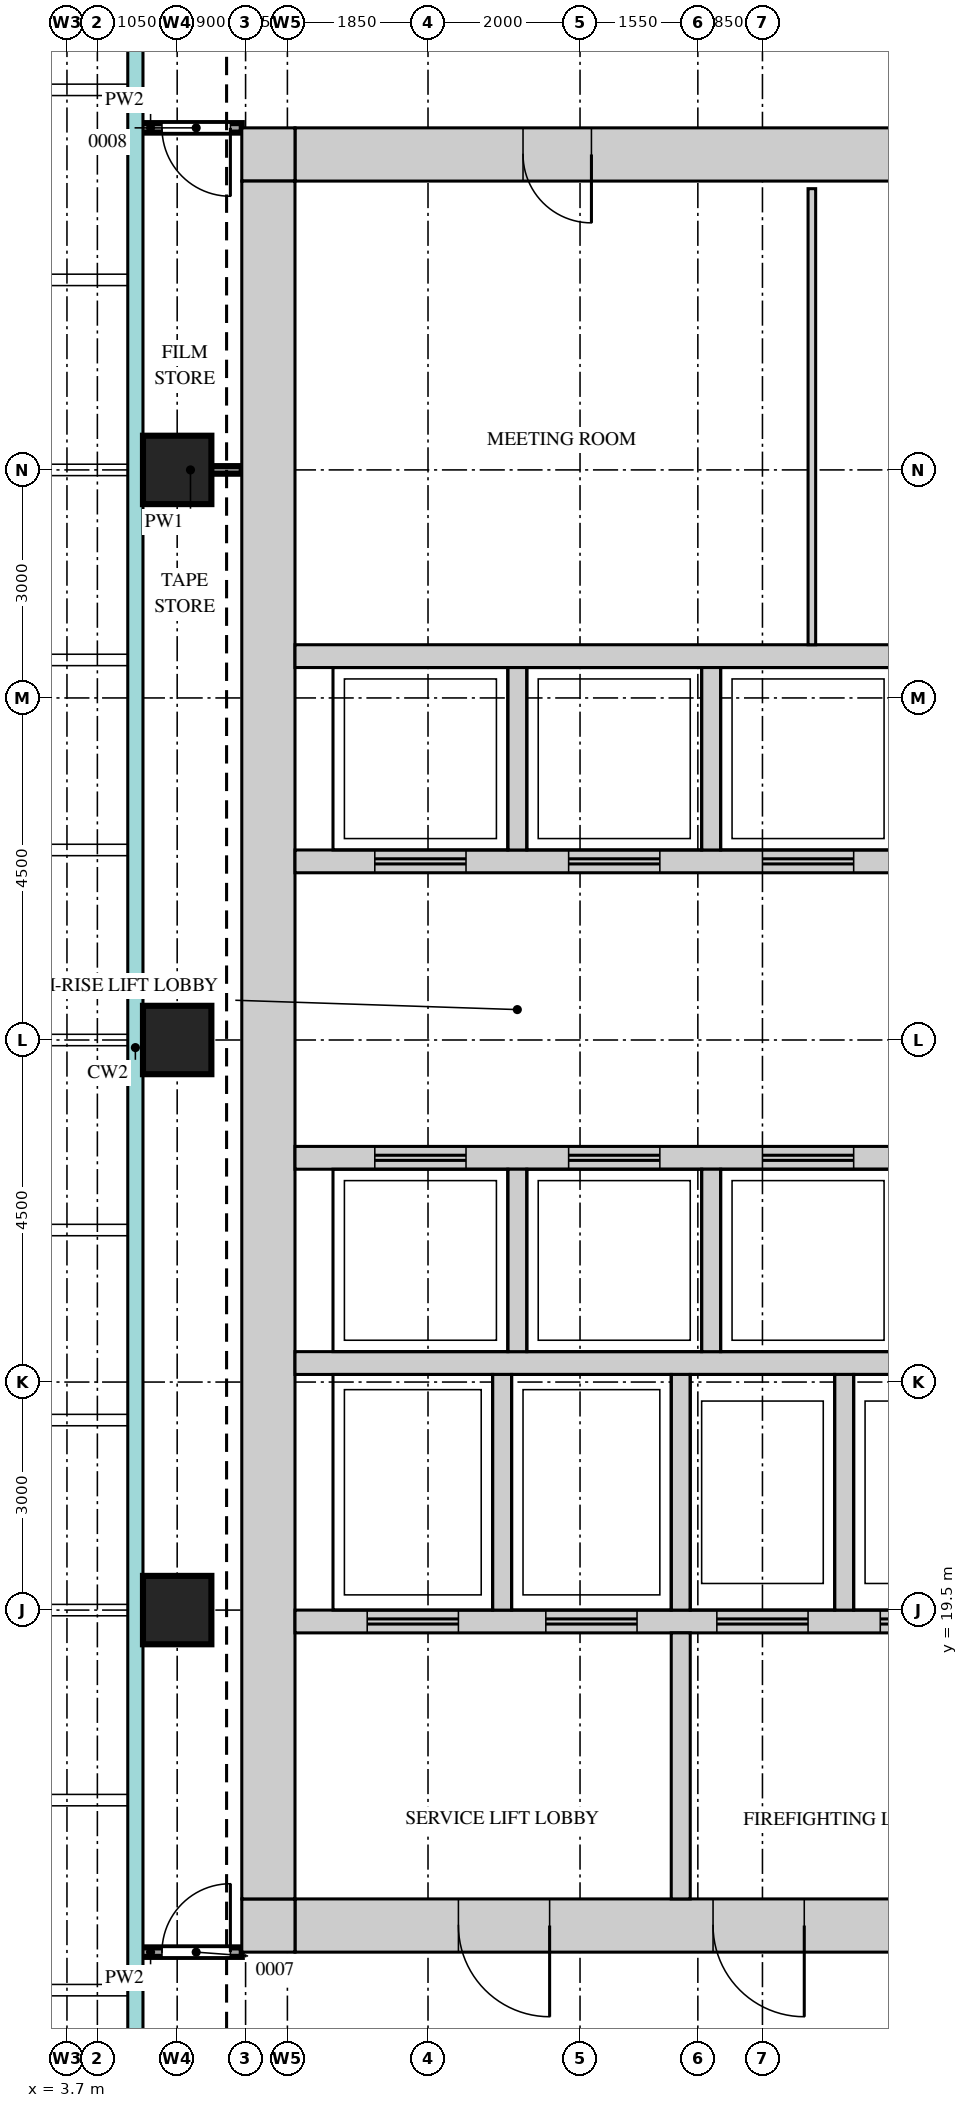
"""IFC4 building model, lengths in metres.
Left out: names, types, materials, properties, quantities, classifications, styles, units other than length and angle.
Written with IfcOpenShell. Run it as: python <this file> out.ifc"""

import sys

from ifc_helpers import new_model, si_unit, direction, frame, frame_2d, origin, origin_2d, place, context, subcontext, project, spatial, rectangle, extrude, source, transform, mapped, element, fill, save


model = new_model("IFC4")
c1 = context("Model", 3, precision=1e-05, world=origin(), true_north=direction((0.0, 1.0)))
c2 = subcontext(c1, "Body", "Model", "MODEL_VIEW")
j1 = project(units=[si_unit("LENGTHUNIT", "METRE"), si_unit("PLANEANGLEUNIT", "RADIAN")], contexts=[c1])
p1 = place(None, origin())
s1 = spatial("IfcSite", under=j1, at=p1, CompositionType="ELEMENT")
p2 = place(p1, origin())
s2 = spatial("IfcBuilding", under=s1, at=p2, CompositionType="ELEMENT")
p3 = place(p2, frame((0.0, 0.0, 246.2)))
s3 = spatial("IfcBuildingStorey", under=s2, at=p3, CompositionType="ELEMENT", Elevation=246.2)
m1 = source(origin(), c2, "Body", "SweptSolid", [
    extrude(rectangle(XDim=13.6, YDim=0.7, at=frame_2d((6.8, 0.0))), origin(), (0.0, 0.0, 1.0), 3.75),
])
p4 = place(p3, frame((6.7, 38.65, 0.0), z_axis=(0.0, 0.0, 1.0), x_axis=(1.0, 0.0, 0.0)))
e1 = element("IfcWall", 1, at=p4, inside=s3, PredefinedType="SHEAR", context=c2, shape_type="MappedRepresentation", body=[
    mapped(m1, transform((0.0, 0.0, 0.0))),
])
m2 = source(origin(), c2, "Body", "SweptSolid", [
    extrude(rectangle(XDim=0.9, YDim=2.1, at=frame_2d((0.45, 1.05))), frame((0.0, 0.36, 0.0), z_axis=(0.0, -1.0, 0.0), x_axis=(1.0, 0.0, 0.0)), (0.0, 0.0, 1.0), 0.72),
])
p5 = place(p4, frame((3.0, 0.0, 0.0)))
e2 = element("IfcOpeningElement", 2, at=p5, cuts=e1, PredefinedType="OPENING", context=c2, shape_type="MappedRepresentation", body=[
    mapped(m2, transform((0.0, 0.0, 0.0))),
])
p6 = place(p4, frame((9.7, 0.0, 0.0)))
e3 = element("IfcOpeningElement", 3, at=p6, cuts=e1, PredefinedType="OPENING", context=c2, shape_type="MappedRepresentation", body=[
    mapped(m2, transform((0.0, 0.0, 0.0))),
])
m3 = source(origin(), c2, "Body", "SweptSolid", [
    extrude(rectangle(XDim=0.7, YDim=0.7, at=frame_2d((0.35, 0.0))), origin(), (0.0, 0.0, 1.0), 3.75),
])
p7 = place(p3, frame((6.0, 38.65, 0.0), z_axis=(0.0, 0.0, 1.0), x_axis=(1.0, 0.0, 0.0)))
e4 = element("IfcWall", 4, at=p7, inside=s3, PredefinedType="SHEAR", context=c2, shape_type="MappedRepresentation", body=[
    mapped(m3, transform((0.0, 0.0, 0.0))),
])
p8 = place(p3, frame((6.7, 15.35, 0.0), z_axis=(0.0, 0.0, 1.0), x_axis=(1.0, 0.0, 0.0)))
e5 = element("IfcWall", 5, at=p8, inside=s3, PredefinedType="SHEAR", context=c2, shape_type="MappedRepresentation", body=[
    mapped(m1, transform((0.0, 0.0, 0.0))),
])
m4 = source(origin(), c2, "Body", "SweptSolid", [
    extrude(rectangle(XDim=1.2, YDim=2.1, at=frame_2d((0.6, 1.05))), frame((0.0, 0.36, 0.0), z_axis=(0.0, -1.0, 0.0), x_axis=(1.0, 0.0, 0.0)), (0.0, 0.0, 1.0), 0.72),
])
p9 = place(p8, frame((5.5, 0.0, 0.0)))
e6 = element("IfcOpeningElement", 6, at=p9, cuts=e5, PredefinedType="OPENING", context=c2, shape_type="MappedRepresentation", body=[
    mapped(m4, transform((0.0, 0.0, 0.0))),
])
p10 = place(p8, frame((2.15, 0.0, 0.0)))
e7 = element("IfcOpeningElement", 7, at=p10, cuts=e5, PredefinedType="OPENING", context=c2, shape_type="MappedRepresentation", body=[
    mapped(m4, transform((0.0, 0.0, 0.0))),
])
m5 = source(origin(), c2, "Body", "SweptSolid", [
    extrude(rectangle(XDim=1.0, YDim=2.1, at=frame_2d((0.5, 1.05))), frame((0.0, 0.36, 0.0), z_axis=(0.0, -1.0, 0.0), x_axis=(1.0, 0.0, 0.0)), (0.0, 0.0, 1.0), 0.72),
])
p11 = place(p8, frame((8.0, 0.0, 0.0)))
e8 = element("IfcOpeningElement", 8, at=p11, cuts=e5, PredefinedType="OPENING", context=c2, shape_type="MappedRepresentation", body=[
    mapped(m5, transform((0.0, 0.0, 0.0))),
])
p12 = place(p3, frame((6.0, 15.35, 0.0), z_axis=(0.0, 0.0, 1.0), x_axis=(1.0, 0.0, 0.0)))
e9 = element("IfcWall", 9, at=p12, inside=s3, PredefinedType="SHEAR", context=c2, shape_type="MappedRepresentation", body=[
    mapped(m3, transform((0.0, 0.0, 0.0))),
])
m6 = source(origin(), c2, "Body", "SweptSolid", [
    extrude(rectangle(XDim=22.6, YDim=0.7, at=frame_2d((11.3, 0.0))), origin(), (0.0, 0.0, 1.0), 3.75),
])
p13 = place(p3, frame((6.35, 15.7, 0.0), z_axis=(0.0, 0.0, 1.0), x_axis=(0.0, 1.0, 0.0)))
e10 = element("IfcWall", 10, at=p13, inside=s3, PredefinedType="SHEAR", context=c2, shape_type="MappedRepresentation", body=[
    mapped(m6, transform((0.0, 0.0, 0.0))),
])
m7 = source(origin(), c2, "Body", "SweptSolid", [
    extrude(rectangle(XDim=13.6, YDim=0.3, at=frame_2d((6.8, 0.0))), origin(), (0.0, 0.0, 1.0), 3.75),
])
p14 = place(p3, frame((6.7, 22.75, 0.0), z_axis=(0.0, 0.0, 1.0), x_axis=(1.0, 0.0, 0.0)))
e11 = element("IfcWall", 11, at=p14, inside=s3, PredefinedType="STANDARD", context=c2, shape_type="MappedRepresentation", body=[
    mapped(m7, transform((0.0, 0.0, 0.0))),
])
m8 = source(origin(), c2, "Body", "SweptSolid", [
    extrude(rectangle(XDim=9.375, YDim=0.3, at=frame_2d((4.688, 0.0))), origin(), (0.0, 0.0, 1.0), 3.75),
])
p15 = place(p3, frame((6.7, 19.35, 0.0), z_axis=(0.0, 0.0, 1.0), x_axis=(1.0, 0.0, 0.0)))
e12 = element("IfcWall", 12, at=p15, inside=s3, PredefinedType="STANDARD", context=c2, shape_type="MappedRepresentation", body=[
    mapped(m8, transform((0.0, 0.0, 0.0))),
])
m9 = source(origin(), c2, "Body", "SweptSolid", [
    extrude(rectangle(XDim=1.2, YDim=2.1, at=frame_2d((0.6, 1.05))), frame((0.0, 0.16, 0.0), z_axis=(0.0, -1.0, 0.0), x_axis=(1.0, 0.0, 0.0)), (0.0, 0.0, 1.0), 0.32),
])
p16 = place(p15, frame((0.95, 0.0, 0.0)))
e13 = element("IfcOpeningElement", 13, at=p16, cuts=e12, PredefinedType="OPENING", context=c2, shape_type="MappedRepresentation", body=[
    mapped(m9, transform((0.0, 0.0, 0.0))),
])
p17 = place(p15, frame((3.3, 0.0, 0.0)))
e14 = element("IfcOpeningElement", 14, at=p17, cuts=e12, PredefinedType="OPENING", context=c2, shape_type="MappedRepresentation", body=[
    mapped(m9, transform((0.0, 0.0, 0.0))),
])
p18 = place(p15, frame((5.55, 0.0, 0.0)))
e15 = element("IfcOpeningElement", 15, at=p18, cuts=e12, PredefinedType="OPENING", context=c2, shape_type="MappedRepresentation", body=[
    mapped(m9, transform((0.0, 0.0, 0.0))),
])
p19 = place(p15, frame((7.7, 0.0, 0.0)))
e16 = element("IfcOpeningElement", 16, at=p19, cuts=e12, PredefinedType="OPENING", context=c2, shape_type="MappedRepresentation", body=[
    mapped(m9, transform((0.0, 0.0, 0.0))),
])
p20 = place(p3, frame((6.7, 32.05, 0.0), z_axis=(0.0, 0.0, 1.0), x_axis=(1.0, 0.0, 0.0)))
e17 = element("IfcWall", 17, at=p20, inside=s3, PredefinedType="STANDARD", context=c2, shape_type="MappedRepresentation", body=[
    mapped(m7, transform((0.0, 0.0, 0.0))),
])
p21 = place(p3, frame((6.7, 29.35, 0.0), z_axis=(0.0, 0.0, 1.0), x_axis=(1.0, 0.0, 0.0)))
e18 = element("IfcWall", 18, at=p21, inside=s3, PredefinedType="STANDARD", context=c2, shape_type="MappedRepresentation", body=[
    mapped(m7, transform((0.0, 0.0, 0.0))),
])
p22 = place(p21, frame((1.05, 0.0, 0.0)))
e19 = element("IfcOpeningElement", 19, at=p22, cuts=e18, PredefinedType="OPENING", context=c2, shape_type="MappedRepresentation", body=[
    mapped(m9, transform((0.0, 0.0, 0.0))),
])
p23 = place(p21, frame((3.6, 0.0, 0.0)))
e20 = element("IfcOpeningElement", 20, at=p23, cuts=e18, PredefinedType="OPENING", context=c2, shape_type="MappedRepresentation", body=[
    mapped(m9, transform((0.0, 0.0, 0.0))),
])
p24 = place(p21, frame((6.15, 0.0, 0.0)))
e21 = element("IfcOpeningElement", 21, at=p24, cuts=e18, PredefinedType="OPENING", context=c2, shape_type="MappedRepresentation", body=[
    mapped(m9, transform((0.0, 0.0, 0.0))),
])
p25 = place(p21, frame((8.7, 0.0, 0.0)))
e22 = element("IfcOpeningElement", 22, at=p25, cuts=e18, PredefinedType="OPENING", context=c2, shape_type="MappedRepresentation", body=[
    mapped(m9, transform((0.0, 0.0, 0.0))),
])
p26 = place(p21, frame((11.25, 0.0, 0.0)))
e23 = element("IfcOpeningElement", 23, at=p26, cuts=e18, PredefinedType="OPENING", context=c2, shape_type="MappedRepresentation", body=[
    mapped(m9, transform((0.0, 0.0, 0.0))),
])
p27 = place(p3, frame((6.7, 25.45, 0.0), z_axis=(0.0, 0.0, 1.0), x_axis=(1.0, 0.0, 0.0)))
e24 = element("IfcWall", 24, at=p27, inside=s3, PredefinedType="STANDARD", context=c2, shape_type="MappedRepresentation", body=[
    mapped(m7, transform((0.0, 0.0, 0.0))),
])
p28 = place(p27, frame((1.05, 0.0, 0.0)))
e25 = element("IfcOpeningElement", 25, at=p28, cuts=e24, PredefinedType="OPENING", context=c2, shape_type="MappedRepresentation", body=[
    mapped(m9, transform((0.0, 0.0, 0.0))),
])
p29 = place(p27, frame((3.6, 0.0, 0.0)))
e26 = element("IfcOpeningElement", 26, at=p29, cuts=e24, PredefinedType="OPENING", context=c2, shape_type="MappedRepresentation", body=[
    mapped(m9, transform((0.0, 0.0, 0.0))),
])
p30 = place(p27, frame((6.15, 0.0, 0.0)))
e27 = element("IfcOpeningElement", 27, at=p30, cuts=e24, PredefinedType="OPENING", context=c2, shape_type="MappedRepresentation", body=[
    mapped(m9, transform((0.0, 0.0, 0.0))),
])
p31 = place(p27, frame((8.7, 0.0, 0.0)))
e28 = element("IfcOpeningElement", 28, at=p31, cuts=e24, PredefinedType="OPENING", context=c2, shape_type="MappedRepresentation", body=[
    mapped(m9, transform((0.0, 0.0, 0.0))),
])
p32 = place(p27, frame((11.25, 0.0, 0.0)))
e29 = element("IfcOpeningElement", 29, at=p32, cuts=e24, PredefinedType="OPENING", context=c2, shape_type="MappedRepresentation", body=[
    mapped(m9, transform((0.0, 0.0, 0.0))),
])
m10 = source(origin(), c2, "Body", "SweptSolid", [
    extrude(rectangle(XDim=3.1, YDim=0.25, at=frame_2d((1.55, 0.0))), origin(), (0.0, 0.0, 1.0), 3.75),
])
for number, where, z_axis, x_axis in (
    (30, (9.425, 19.5, 0.0), (0.0, 0.0, 1.0), (0.0, 1.0, 0.0)),
    (31, (11.775, 19.5, 0.0), (0.0, 0.0, 1.0), (0.0, 1.0, 0.0)),
    (32, (13.925, 19.5, 0.0), (0.0, 0.0, 1.0), (0.0, 1.0, 0.0)),
):
    element("IfcWall", number, at=place(p3, frame(where, z_axis=z_axis, x_axis=x_axis)), inside=s3, PredefinedType="STANDARD", context=c2, shape_type="MappedRepresentation", body=[
        mapped(m10, transform((0.0, 0.0, 0.0))),
    ])
m11 = source(origin(), c2, "Body", "SweptSolid", [
    extrude(rectangle(XDim=2.4, YDim=0.25, at=frame_2d((1.2, 0.0))), origin(), (0.0, 0.0, 1.0), 3.75),
])
for number, where, z_axis, x_axis in (
    (33, (9.625, 29.5, 0.0), (0.0, 0.0, 1.0), (0.0, 1.0, 0.0)),
    (34, (12.175, 29.5, 0.0), (0.0, 0.0, 1.0), (0.0, 1.0, 0.0)),
):
    element("IfcWall", number, at=place(p3, frame(where, z_axis=z_axis, x_axis=x_axis)), inside=s3, PredefinedType="STANDARD", context=c2, shape_type="MappedRepresentation", body=[
        mapped(m11, transform((0.0, 0.0, 0.0))),
    ])
m12 = source(origin(), c2, "Body", "SweptSolid", [
    extrude(rectangle(XDim=2.4, YDim=0.25, at=frame_2d((1.2, 0.0))), origin(), (0.0, 0.0, 1.0), 3.75),
])
for number, where, z_axis, x_axis in (
    (35, (9.625, 22.9, 0.0), (0.0, 0.0, 1.0), (0.0, 1.0, 0.0)),
    (36, (12.175, 22.9, 0.0), (0.0, 0.0, 1.0), (0.0, 1.0, 0.0)),
):
    element("IfcWall", number, at=place(p3, frame(where, z_axis=z_axis, x_axis=x_axis)), inside=s3, PredefinedType="STANDARD", context=c2, shape_type="MappedRepresentation", body=[
        mapped(m12, transform((0.0, 0.0, 0.0))),
    ])
m13 = source(origin(), c2, "Body", "SweptSolid", [
    extrude(rectangle(XDim=3.5, YDim=0.25, at=frame_2d((1.75, 0.0))), origin(), (0.0, 0.0, 1.0), 3.75),
])
p33 = place(p3, frame((11.775, 15.7, 0.0), z_axis=(0.0, 0.0, 1.0), x_axis=(0.0, 1.0, 0.0)))
e37 = element("IfcWall", 37, at=p33, inside=s3, PredefinedType="STANDARD", context=c2, shape_type="MappedRepresentation", body=[
    mapped(m13, transform((0.0, 0.0, 0.0))),
])
m14 = source(origin(), c2, "Body", "SweptSolid", [
    extrude(rectangle(XDim=0.9, YDim=0.9, at=origin_2d()), origin(), (0.0, 0.0, 1.0), 3.75),
])
for number, where, z_axis, x_axis in (
    (38, (5.15, 19.5, 0.0), (0.0, 0.0, 1.0), (1.0, 0.0, 0.0)),
    (39, (5.15, 27.0, 0.0), (0.0, 0.0, 1.0), (1.0, 0.0, 0.0)),
    (40, (5.15, 34.5, 0.0), (0.0, 0.0, 1.0), (1.0, 0.0, 0.0)),
):
    element("IfcColumn", number, at=place(p3, frame(where, z_axis=z_axis, x_axis=x_axis)), inside=s3, PredefinedType="COLUMN", context=c2, shape_type="MappedRepresentation", body=[
        mapped(m14, transform((0.0, 0.0, 0.0))),
    ])
m15 = source(origin(), c2, "Body", "SweptSolid", [
    extrude(rectangle(XDim=1.35, YDim=0.125, at=frame_2d((0.675, 0.0))), origin(), (0.0, 0.0, 1.0), 3.8),
])
p34 = place(p3, frame((4.65, 15.0, 0.0), z_axis=(0.0, 0.0, 1.0), x_axis=(1.0, 0.0, 0.0)))
e41 = element("IfcWall", 41, at=p34, inside=s3, PredefinedType="PARTITIONING", context=c2, shape_type="MappedRepresentation", body=[
    mapped(m15, transform((0.0, 0.0, 0.0))),
])
m16 = source(origin(), c2, "Body", "SweptSolid", [
    extrude(rectangle(XDim=0.9, YDim=2.1, at=frame_2d((0.45, 1.05))), frame((0.0, 0.073, 0.0), z_axis=(0.0, -1.0, 0.0), x_axis=(1.0, 0.0, 0.0)), (0.0, 0.0, 1.0), 0.145),
])
p35 = place(p34, frame((0.3, 0.0, 0.0)))
e42 = element("IfcOpeningElement", 42, at=p35, cuts=e41, PredefinedType="OPENING", context=c2, shape_type="MappedRepresentation", body=[
    mapped(m16, transform((0.0, 0.0, 0.0))),
])
m17 = source(origin(), c2, "Body", "SweptSolid", [
    extrude(rectangle(XDim=6.0, YDim=0.1, at=frame_2d((3.0, 0.0))), origin(), (0.0, 0.0, 1.0), 3.8),
])
p36 = place(p3, frame((13.5, 32.2, 0.0), z_axis=(0.0, 0.0, 1.0), x_axis=(0.0, 1.0, 0.0)))
e43 = element("IfcWall", 43, at=p36, inside=s3, PredefinedType="PARTITIONING", context=c2, shape_type="MappedRepresentation", body=[
    mapped(m17, transform((0.0, 0.0, 0.0))),
])
m18 = source(origin(), c2, "Body", "SweptSolid", [
    extrude(rectangle(XDim=1.35, YDim=0.1, at=frame_2d((0.675, 0.0))), origin(), (0.0, 0.0, 1.0), 3.8),
])
p37 = place(p3, frame((4.65, 34.5, 0.0), z_axis=(0.0, 0.0, 1.0), x_axis=(1.0, 0.0, 0.0)))
e44 = element("IfcWall", 44, at=p37, inside=s3, PredefinedType="PARTITIONING", context=c2, shape_type="MappedRepresentation", body=[
    mapped(m18, transform((0.0, 0.0, 0.0))),
])
p38 = place(p3, frame((4.65, 39.0, 0.0), z_axis=(0.0, 0.0, 1.0), x_axis=(1.0, 0.0, 0.0)))
e45 = element("IfcWall", 45, at=p38, inside=s3, PredefinedType="PARTITIONING", context=c2, shape_type="MappedRepresentation", body=[
    mapped(m15, transform((0.0, 0.0, 0.0))),
])
p39 = place(p38, frame((0.3, 0.0, 0.0)))
e46 = element("IfcOpeningElement", 46, at=p39, cuts=e45, PredefinedType="OPENING", context=c2, shape_type="MappedRepresentation", body=[
    mapped(m16, transform((0.0, 0.0, 0.0))),
])
m19 = source(origin(), c2, "Body", "SweptSolid", [
    extrude(rectangle(XDim=0.9, YDim=2.1, at=frame_2d((0.45, 1.05))), frame((0.0, 0.3, 0.0), z_axis=(0.0, -1.0, 0.0), x_axis=(1.0, 0.0, 0.0)), (0.0, 0.0, 1.0), 0.6),
])
p40 = place(p5, origin())
e47 = element("IfcDoor", 47, at=p40, inside=s3, OperationType="SINGLE_SWING_RIGHT", PredefinedType="DOOR", context=c2, shape_type="MappedRepresentation", body=[
    mapped(m19, transform((0.0, 0.0, 0.0))),
])
fill(e2, e47)
m20 = source(origin(), c2, "Body", "SweptSolid", [
    extrude(rectangle(XDim=1.2, YDim=2.1, at=frame_2d((0.6, 1.05))), frame((0.0, 0.3, 0.0), z_axis=(0.0, -1.0, 0.0), x_axis=(1.0, 0.0, 0.0)), (0.0, 0.0, 1.0), 0.6),
])
p41 = place(p9, origin())
e48 = element("IfcDoor", 48, at=p41, inside=s3, OperationType="SINGLE_SWING_RIGHT", PredefinedType="DOOR", context=c2, shape_type="MappedRepresentation", body=[
    mapped(m20, transform((0.0, 0.0, 0.0))),
])
fill(e6, e48)
p42 = place(p10, origin())
e49 = element("IfcDoor", 49, at=p42, inside=s3, OperationType="SINGLE_SWING_RIGHT", PredefinedType="DOOR", context=c2, shape_type="MappedRepresentation", body=[
    mapped(m20, transform((0.0, 0.0, 0.0))),
])
fill(e7, e49)
m21 = source(origin(), c2, "Body", "SweptSolid", [
    extrude(rectangle(XDim=0.9, YDim=2.1, at=frame_2d((0.45, 1.05))), frame((0.0, 0.025, 0.0), z_axis=(0.0, -1.0, 0.0), x_axis=(1.0, 0.0, 0.0)), (0.0, 0.0, 1.0), 0.05),
])
p43 = place(p35, origin())
e50 = element("IfcDoor", 50, at=p43, inside=s3, OperationType="SINGLE_SWING_LEFT", PredefinedType="DOOR", context=c2, shape_type="MappedRepresentation", body=[
    mapped(m21, transform((0.0, 0.0, 0.0))),
])
fill(e42, e50)
p44 = place(p39, origin())
e51 = element("IfcDoor", 51, at=p44, inside=s3, OperationType="SINGLE_SWING_RIGHT", PredefinedType="DOOR", context=c2, shape_type="MappedRepresentation", body=[
    mapped(m21, transform((0.0, 0.0, 0.0))),
])
fill(e46, e51)
m22 = source(origin(), c2, "Body", "SweptSolid", [
    extrude(rectangle(XDim=1.2, YDim=2.1, at=frame_2d((0.6, 1.05))), frame((0.0, 0.025, 0.0), z_axis=(0.0, -1.0, 0.0), x_axis=(1.0, 0.0, 0.0)), (0.0, 0.0, 1.0), 0.05),
])
p45 = place(p28, origin())
e52 = element("IfcDoor", 52, at=p45, inside=s3, OperationType="DOUBLE_DOOR_SLIDING", PredefinedType="DOOR", context=c2, shape_type="MappedRepresentation", body=[
    mapped(m22, transform((0.0, 0.0, 0.0))),
])
fill(e25, e52)
p46 = place(p29, origin())
e53 = element("IfcDoor", 53, at=p46, inside=s3, OperationType="DOUBLE_DOOR_SLIDING", PredefinedType="DOOR", context=c2, shape_type="MappedRepresentation", body=[
    mapped(m22, transform((0.0, 0.0, 0.0))),
])
fill(e26, e53)
p47 = place(p30, origin())
e54 = element("IfcDoor", 54, at=p47, inside=s3, OperationType="DOUBLE_DOOR_SLIDING", PredefinedType="DOOR", context=c2, shape_type="MappedRepresentation", body=[
    mapped(m22, transform((0.0, 0.0, 0.0))),
])
fill(e27, e54)
p48 = place(p22, origin())
e55 = element("IfcDoor", 55, at=p48, inside=s3, OperationType="DOUBLE_DOOR_SLIDING", PredefinedType="DOOR", context=c2, shape_type="MappedRepresentation", body=[
    mapped(m22, transform((0.0, 0.0, 0.0))),
])
fill(e19, e55)
p49 = place(p23, origin())
e56 = element("IfcDoor", 56, at=p49, inside=s3, OperationType="DOUBLE_DOOR_SLIDING", PredefinedType="DOOR", context=c2, shape_type="MappedRepresentation", body=[
    mapped(m22, transform((0.0, 0.0, 0.0))),
])
fill(e20, e56)
p50 = place(p24, origin())
e57 = element("IfcDoor", 57, at=p50, inside=s3, OperationType="DOUBLE_DOOR_SLIDING", PredefinedType="DOOR", context=c2, shape_type="MappedRepresentation", body=[
    mapped(m22, transform((0.0, 0.0, 0.0))),
])
fill(e21, e57)
p51 = place(p16, origin())
e58 = element("IfcDoor", 58, at=p51, inside=s3, OperationType="DOUBLE_DOOR_SLIDING", PredefinedType="DOOR", context=c2, shape_type="MappedRepresentation", body=[
    mapped(m22, transform((0.0, 0.0, 0.0))),
])
fill(e13, e58)
p52 = place(p17, origin())
e59 = element("IfcDoor", 59, at=p52, inside=s3, OperationType="DOUBLE_DOOR_SLIDING", PredefinedType="DOOR", context=c2, shape_type="MappedRepresentation", body=[
    mapped(m22, transform((0.0, 0.0, 0.0))),
])
fill(e14, e59)
p53 = place(p18, origin())
e60 = element("IfcDoor", 60, at=p53, inside=s3, OperationType="DOUBLE_DOOR_SLIDING", PredefinedType="DOOR", context=c2, shape_type="MappedRepresentation", body=[
    mapped(m22, transform((0.0, 0.0, 0.0))),
])
fill(e15, e60)
p54 = place(p19, origin())
e61 = element("IfcDoor", 61, at=p54, inside=s3, OperationType="DOUBLE_DOOR_SLIDING", PredefinedType="DOOR", context=c2, shape_type="MappedRepresentation", body=[
    mapped(m22, transform((0.0, 0.0, 0.0))),
])
fill(e16, e61)
save(model, sys.argv[1])
